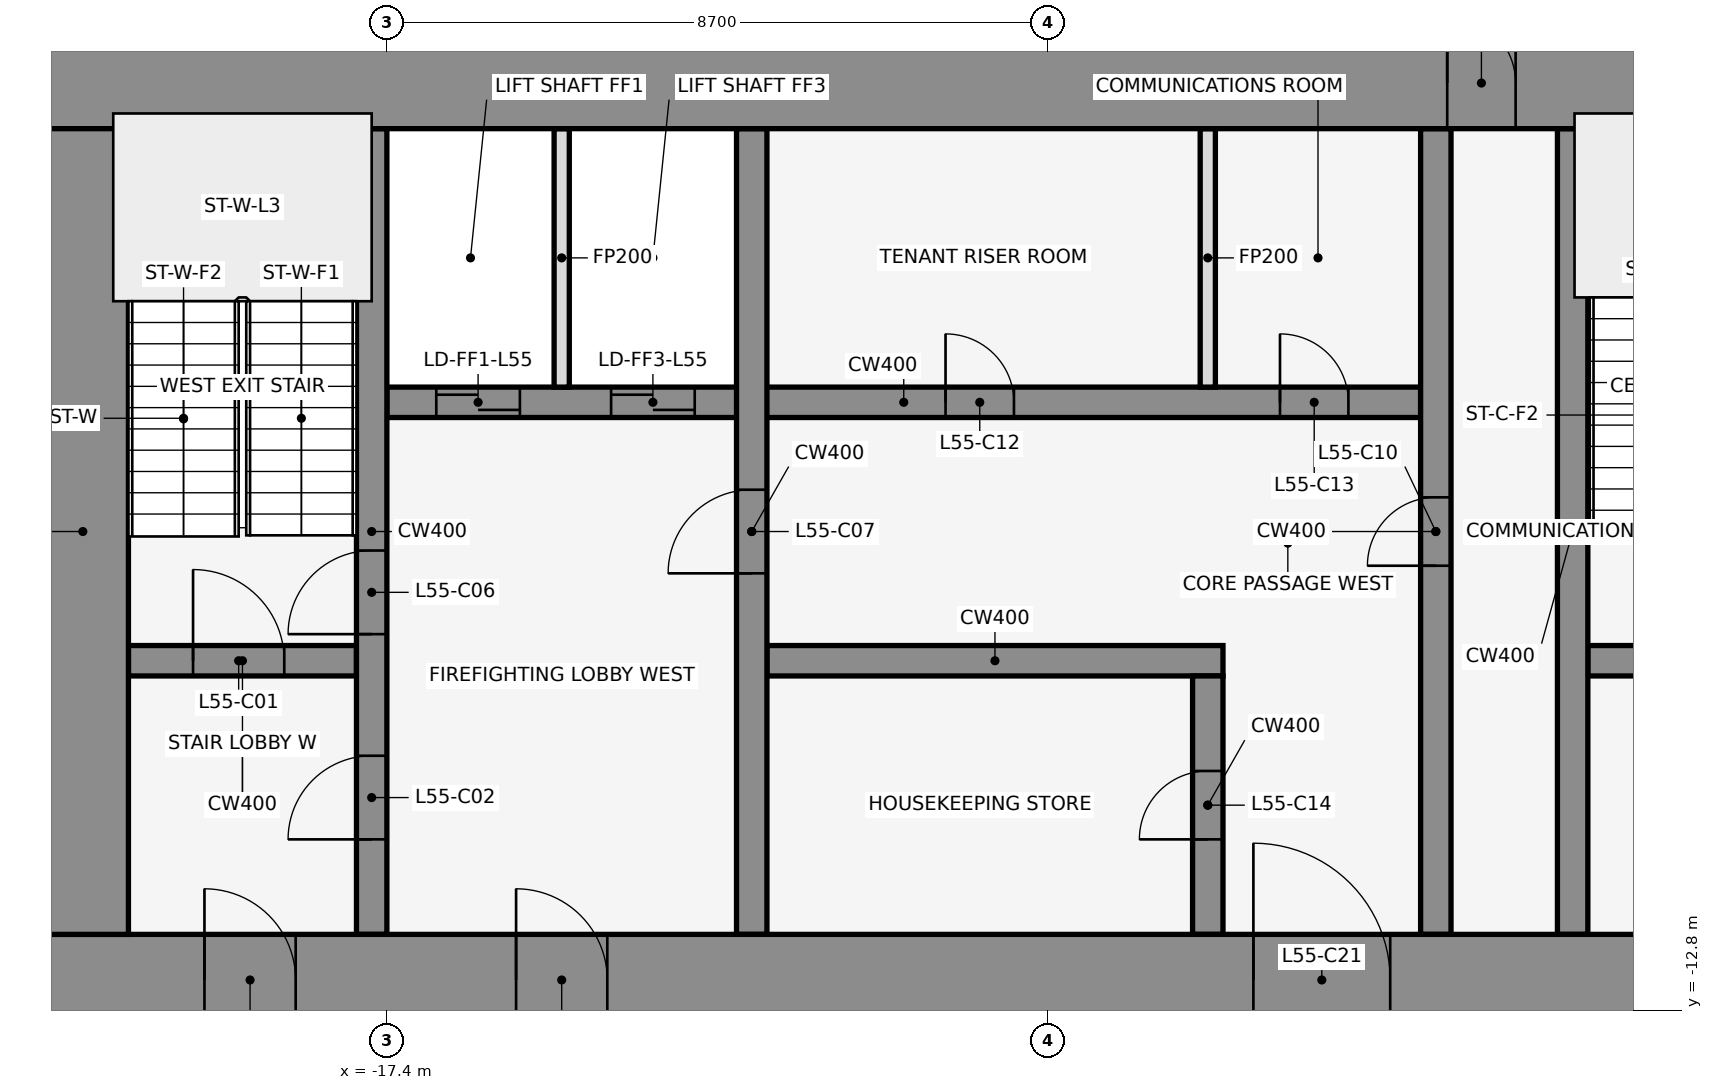
"""IFC4 building model, lengths in metres.
Left out: names, types, materials, properties, quantities, classifications, styles, units other than length and angle.
Written with IfcOpenShell. Run it as: python <this file> out.ifc"""

import sys

from ifc_helpers import new_model, si_unit, direction, frame, frame_2d, origin, place, context, subcontext, project, spatial, rectangle, extrude, element, fill, save


model = new_model("IFC4")
c1 = context("Model", 3, precision=1e-05, world=origin(), true_north=direction((0.0, 1.0)))
c2 = subcontext(c1, "Body", "Model", "MODEL_VIEW")
j1 = project(units=[si_unit("LENGTHUNIT", "METRE"), si_unit("PLANEANGLEUNIT", "RADIAN")], contexts=[c1])
p1 = place(None, origin())
s1 = spatial("IfcSite", under=j1, at=p1, CompositionType="ELEMENT")
p2 = place(p1, origin())
s2 = spatial("IfcBuilding", under=s1, at=p2, CompositionType="ELEMENT")
p3 = place(p2, frame((0.0, 0.0, 245.6)))
s3 = spatial("IfcBuildingStorey", under=s2, at=p3, CompositionType="ELEMENT", Elevation=245.6)
for number, where, z_axis, x_axis in (
    (1, (-0.068, -0.105, 0.0), (0.0, 0.0, 1.0), (-0.84, 0.543, 0.0)),
    (2, (-14.599, 1.08, 0.0), (0.0, 0.0, 1.0), (-0.84, -0.543, 0.0)),
):
    element("IfcWall", number, at=place(p3, frame(where, z_axis=z_axis, x_axis=x_axis)), inside=s3, PredefinedType="STANDARD", context=c2, shape_type="SweptSolid", body=[
        extrude(rectangle(XDim=2.183, YDim=0.25, at=frame_2d((1.091, 0.0))), origin(), (0.0, 0.0, 1.0), 4.05),
    ])
p4 = place(p3, frame((-20.8, -8.2, 0.0), z_axis=(0.0, 0.0, 1.0), x_axis=(1.0, 0.0, 0.0)))
e3 = element("IfcWall", 3, at=p4, inside=s3, PredefinedType="SHEAR", context=c2, shape_type="SweptSolid", body=[
    extrude(rectangle(XDim=3.0, YDim=0.4, at=frame_2d((1.5, 0.0))), origin(), (0.0, 0.0, 1.0), 4.2),
])
p5 = place(p4, frame((0.85, 0.0, 0.0)))
e4 = element("IfcOpeningElement", 4, at=p5, cuts=e3, PredefinedType="OPENING", context=c2, shape_type="SweptSolid", body=[
    extrude(rectangle(XDim=1.2, YDim=2.1, at=frame_2d((0.6, 1.05))), frame((0.0, 0.212, 0.0), z_axis=(0.0, -1.0, 0.0), x_axis=(1.0, 0.0, 0.0)), (0.0, 0.0, 1.0), 0.424),
])
p6 = place(p3, frame((-12.4, -8.2, 0.0), z_axis=(0.0, 0.0, 1.0), x_axis=(1.0, 0.0, 0.0)))
e5 = element("IfcWall", 5, at=p6, inside=s3, PredefinedType="SHEAR", context=c2, shape_type="SweptSolid", body=[
    extrude(rectangle(XDim=6.0, YDim=0.4, at=frame_2d((3.0, 0.0))), origin(), (0.0, 0.0, 1.0), 4.2),
])
p7 = place(p3, frame((-1.6, -8.2, 0.0), z_axis=(0.0, 0.0, 1.0), x_axis=(1.0, 0.0, 0.0)))
e6 = element("IfcWall", 6, at=p7, inside=s3, PredefinedType="SHEAR", context=c2, shape_type="SweptSolid", body=[
    extrude(rectangle(XDim=3.2, YDim=0.4, at=frame_2d((1.6, 0.0))), origin(), (0.0, 0.0, 1.0), 4.2),
])
p8 = place(p7, frame((1.05, 0.0, 0.0)))
e7 = element("IfcOpeningElement", 7, at=p8, cuts=e6, PredefinedType="OPENING", context=c2, shape_type="SweptSolid", body=[
    extrude(rectangle(XDim=1.2, YDim=2.1, at=frame_2d((0.6, 1.05))), frame((0.0, 0.212, 0.0), z_axis=(0.0, -1.0, 0.0), x_axis=(1.0, 0.0, 0.0)), (0.0, 0.0, 1.0), 0.424),
])
p9 = place(p3, frame((-17.4, -4.8, 0.0), z_axis=(0.0, 0.0, 1.0), x_axis=(1.0, 0.0, 0.0)))
e8 = element("IfcWall", 8, at=p9, inside=s3, PredefinedType="SHEAR", context=c2, shape_type="SweptSolid", body=[
    extrude(rectangle(XDim=13.6, YDim=0.4, at=frame_2d((6.8, 0.0))), origin(), (0.0, 0.0, 1.0), 4.2),
])
p10 = place(p9, frame((0.65, 0.0, 0.0)))
e9 = element("IfcOpeningElement", 9, at=p10, cuts=e8, PredefinedType="OPENING", context=c2, shape_type="SweptSolid", body=[
    extrude(rectangle(XDim=1.1, YDim=2.1, at=frame_2d((0.55, 1.05))), frame((0.0, 0.212, 0.0), z_axis=(0.0, -1.0, 0.0), x_axis=(1.0, 0.0, 0.0)), (0.0, 0.0, 1.0), 0.424),
])
p11 = place(p9, frame((2.95, 0.0, 0.0)))
e10 = element("IfcOpeningElement", 10, at=p11, cuts=e8, PredefinedType="OPENING", context=c2, shape_type="SweptSolid", body=[
    extrude(rectangle(XDim=1.1, YDim=2.1, at=frame_2d((0.55, 1.05))), frame((0.0, 0.212, 0.0), z_axis=(0.0, -1.0, 0.0), x_axis=(1.0, 0.0, 0.0)), (0.0, 0.0, 1.0), 0.424),
])
p12 = place(p9, frame((7.35, 0.0, 0.0)))
e11 = element("IfcOpeningElement", 11, at=p12, cuts=e8, PredefinedType="OPENING", context=c2, shape_type="SweptSolid", body=[
    extrude(rectangle(XDim=0.9, YDim=2.1, at=frame_2d((0.45, 1.05))), frame((0.0, 0.212, 0.0), z_axis=(0.0, -1.0, 0.0), x_axis=(1.0, 0.0, 0.0)), (0.0, 0.0, 1.0), 0.424),
])
p13 = place(p9, frame((11.75, 0.0, 0.0)))
e12 = element("IfcOpeningElement", 12, at=p13, cuts=e8, PredefinedType="OPENING", context=c2, shape_type="SweptSolid", body=[
    extrude(rectangle(XDim=0.9, YDim=2.1, at=frame_2d((0.45, 1.05))), frame((0.0, 0.212, 0.0), z_axis=(0.0, -1.0, 0.0), x_axis=(1.0, 0.0, 0.0)), (0.0, 0.0, 1.0), 0.424),
])
p14 = place(p3, frame((-17.6, -11.8, 0.0), z_axis=(0.0, 0.0, 1.0), x_axis=(0.0, 1.0, 0.0)))
e13 = element("IfcWall", 13, at=p14, inside=s3, PredefinedType="SHEAR", context=c2, shape_type="SweptSolid", body=[
    extrude(rectangle(XDim=10.6, YDim=0.4, at=frame_2d((5.3, 0.0))), origin(), (0.0, 0.0, 1.0), 4.2),
])
p15 = place(p14, frame((1.25, 0.0, 0.0)))
e14 = element("IfcOpeningElement", 14, at=p15, cuts=e13, PredefinedType="OPENING", context=c2, shape_type="SweptSolid", body=[
    extrude(rectangle(XDim=1.1, YDim=2.1, at=frame_2d((0.55, 1.05))), frame((0.0, 0.212, 0.0), z_axis=(0.0, -1.0, 0.0), x_axis=(1.0, 0.0, 0.0)), (0.0, 0.0, 1.0), 0.424),
])
p16 = place(p14, frame((3.95, 0.0, 0.0)))
e15 = element("IfcOpeningElement", 15, at=p16, cuts=e13, PredefinedType="OPENING", context=c2, shape_type="SweptSolid", body=[
    extrude(rectangle(XDim=1.1, YDim=2.1, at=frame_2d((0.55, 1.05))), frame((0.0, 0.212, 0.0), z_axis=(0.0, -1.0, 0.0), x_axis=(1.0, 0.0, 0.0)), (0.0, 0.0, 1.0), 0.424),
])
p17 = place(p3, frame((-15.1, -4.6, 0.0), z_axis=(0.0, 0.0, 1.0), x_axis=(0.0, 1.0, 0.0)))
e16 = element("IfcWall", 16, at=p17, inside=s3, PredefinedType="PARTITIONING", context=c2, shape_type="SweptSolid", body=[
    extrude(rectangle(XDim=3.4, YDim=0.2, at=frame_2d((1.7, 0.0))), origin(), (0.0, 0.0, 1.0), 3.039),
])
p18 = place(p3, frame((-12.6, -11.8, 0.0), z_axis=(0.0, 0.0, 1.0), x_axis=(0.0, 1.0, 0.0)))
e17 = element("IfcWall", 17, at=p18, inside=s3, PredefinedType="SHEAR", context=c2, shape_type="SweptSolid", body=[
    extrude(rectangle(XDim=10.6, YDim=0.4, at=frame_2d((5.3, 0.0))), origin(), (0.0, 0.0, 1.0), 4.2),
])
p19 = place(p18, frame((4.75, 0.0, 0.0)))
e18 = element("IfcOpeningElement", 18, at=p19, cuts=e17, PredefinedType="OPENING", context=c2, shape_type="SweptSolid", body=[
    extrude(rectangle(XDim=1.1, YDim=2.1, at=frame_2d((0.55, 1.05))), frame((0.0, 0.212, 0.0), z_axis=(0.0, -1.0, 0.0), x_axis=(1.0, 0.0, 0.0)), (0.0, 0.0, 1.0), 0.424),
])
p20 = place(p3, frame((-6.6, -11.8, 0.0), z_axis=(0.0, 0.0, 1.0), x_axis=(0.0, 1.0, 0.0)))
e19 = element("IfcWall", 19, at=p20, inside=s3, PredefinedType="SHEAR", context=c2, shape_type="SweptSolid", body=[
    extrude(rectangle(XDim=3.4, YDim=0.4, at=frame_2d((1.7, 0.0))), origin(), (0.0, 0.0, 1.0), 4.2),
])
p21 = place(p20, frame((1.25, 0.0, 0.0)))
e20 = element("IfcOpeningElement", 20, at=p21, cuts=e19, PredefinedType="OPENING", context=c2, shape_type="SweptSolid", body=[
    extrude(rectangle(XDim=0.9, YDim=2.1, at=frame_2d((0.45, 1.05))), frame((0.0, 0.212, 0.0), z_axis=(0.0, -1.0, 0.0), x_axis=(1.0, 0.0, 0.0)), (0.0, 0.0, 1.0), 0.424),
])
p22 = place(p3, frame((-6.6, -4.6, 0.0), z_axis=(0.0, 0.0, 1.0), x_axis=(0.0, 1.0, 0.0)))
e21 = element("IfcWall", 21, at=p22, inside=s3, PredefinedType="PARTITIONING", context=c2, shape_type="SweptSolid", body=[
    extrude(rectangle(XDim=3.4, YDim=0.2, at=frame_2d((1.7, 0.0))), origin(), (0.0, 0.0, 1.0), 3.039),
])
p23 = place(p3, frame((-3.6, -11.8, 0.0), z_axis=(0.0, 0.0, 1.0), x_axis=(0.0, 1.0, 0.0)))
e22 = element("IfcWall", 22, at=p23, inside=s3, PredefinedType="SHEAR", context=c2, shape_type="SweptSolid", body=[
    extrude(rectangle(XDim=10.6, YDim=0.4, at=frame_2d((5.3, 0.0))), origin(), (0.0, 0.0, 1.0), 4.2),
])
p24 = place(p23, frame((4.85, 0.0, 0.0)))
e23 = element("IfcOpeningElement", 23, at=p24, cuts=e22, PredefinedType="OPENING", context=c2, shape_type="SweptSolid", body=[
    extrude(rectangle(XDim=0.9, YDim=2.1, at=frame_2d((0.45, 1.05))), frame((0.0, 0.212, 0.0), z_axis=(0.0, -1.0, 0.0), x_axis=(1.0, 0.0, 0.0)), (0.0, 0.0, 1.0), 0.424),
])
p25 = place(p3, frame((-1.8, -11.8, 0.0), z_axis=(0.0, 0.0, 1.0), x_axis=(0.0, 1.0, 0.0)))
e24 = element("IfcWall", 24, at=p25, inside=s3, PredefinedType="SHEAR", context=c2, shape_type="SweptSolid", body=[
    extrude(rectangle(XDim=10.6, YDim=0.4, at=frame_2d((5.3, 0.0))), origin(), (0.0, 0.0, 1.0), 4.2),
])
p26 = place(p3, frame((-22.0, -0.6, 0.0), z_axis=(0.0, 0.0, 1.0), x_axis=(1.0, 0.0, 0.0)))
e25 = element("IfcWall", 25, at=p26, inside=s3, PredefinedType="SHEAR", context=c2, shape_type="SweptSolid", body=[
    extrude(rectangle(XDim=44.0, YDim=1.2, at=frame_2d((22.0, 0.0))), origin(), (0.0, 0.0, 1.0), 4.2),
])
p27 = place(p26, frame((18.55, 0.0, 0.0)))
e26 = element("IfcOpeningElement", 26, at=p27, cuts=e25, PredefinedType="OPENING", context=c2, shape_type="SweptSolid", body=[
    extrude(rectangle(XDim=0.9, YDim=2.1, at=frame_2d((0.45, 1.05))), frame((0.0, 0.612, 0.0), z_axis=(0.0, -1.0, 0.0), x_axis=(1.0, 0.0, 0.0)), (0.0, 0.0, 1.0), 1.224),
])
p28 = place(p26, frame((24.55, 0.0, 0.0)))
e27 = element("IfcOpeningElement", 27, at=p28, cuts=e25, PredefinedType="OPENING", context=c2, shape_type="SweptSolid", body=[
    extrude(rectangle(XDim=0.9, YDim=2.1, at=frame_2d((0.45, 1.05))), frame((0.0, 0.612, 0.0), z_axis=(0.0, -1.0, 0.0), x_axis=(1.0, 0.0, 0.0)), (0.0, 0.0, 1.0), 1.224),
])
p29 = place(p3, frame((-22.0, -12.4, 0.0), z_axis=(0.0, 0.0, 1.0), x_axis=(1.0, 0.0, 0.0)))
e28 = element("IfcWall", 28, at=p29, inside=s3, PredefinedType="SHEAR", context=c2, shape_type="SweptSolid", body=[
    extrude(rectangle(XDim=44.0, YDim=1.2, at=frame_2d((22.0, 0.0))), origin(), (0.0, 0.0, 1.0), 4.2),
])
p30 = place(p29, frame((2.2, 0.0, 0.0)))
e29 = element("IfcOpeningElement", 29, at=p30, cuts=e28, PredefinedType="OPENING", context=c2, shape_type="SweptSolid", body=[
    extrude(rectangle(XDim=1.2, YDim=2.1, at=frame_2d((0.6, 1.05))), frame((0.0, 0.612, 0.0), z_axis=(0.0, -1.0, 0.0), x_axis=(1.0, 0.0, 0.0)), (0.0, 0.0, 1.0), 1.224),
])
p31 = place(p29, frame((21.4, 0.0, 0.0)))
e30 = element("IfcOpeningElement", 30, at=p31, cuts=e28, PredefinedType="OPENING", context=c2, shape_type="SweptSolid", body=[
    extrude(rectangle(XDim=1.2, YDim=2.1, at=frame_2d((0.6, 1.05))), frame((0.0, 0.612, 0.0), z_axis=(0.0, -1.0, 0.0), x_axis=(1.0, 0.0, 0.0)), (0.0, 0.0, 1.0), 1.224),
])
p32 = place(p29, frame((40.6, 0.0, 0.0)))
e31 = element("IfcOpeningElement", 31, at=p32, cuts=e28, PredefinedType="OPENING", context=c2, shape_type="SweptSolid", body=[
    extrude(rectangle(XDim=1.2, YDim=2.1, at=frame_2d((0.6, 1.05))), frame((0.0, 0.612, 0.0), z_axis=(0.0, -1.0, 0.0), x_axis=(1.0, 0.0, 0.0)), (0.0, 0.0, 1.0), 1.224),
])
p33 = place(p29, frame((16.0, 0.0, 0.0)))
e32 = element("IfcOpeningElement", 32, at=p33, cuts=e28, PredefinedType="OPENING", context=c2, shape_type="SweptSolid", body=[
    extrude(rectangle(XDim=1.8, YDim=2.1, at=frame_2d((0.9, 1.05))), frame((0.0, 0.612, 0.0), z_axis=(0.0, -1.0, 0.0), x_axis=(1.0, 0.0, 0.0)), (0.0, 0.0, 1.0), 1.224),
])
p34 = place(p29, frame((6.3, 0.0, 0.0)))
e33 = element("IfcOpeningElement", 33, at=p34, cuts=e28, PredefinedType="OPENING", context=c2, shape_type="SweptSolid", body=[
    extrude(rectangle(XDim=1.2, YDim=2.1, at=frame_2d((0.6, 1.05))), frame((0.0, 0.612, 0.0), z_axis=(0.0, -1.0, 0.0), x_axis=(1.0, 0.0, 0.0)), (0.0, 0.0, 1.0), 1.224),
])
p35 = place(p29, frame((26.2, 0.0, 0.0)))
e34 = element("IfcOpeningElement", 34, at=p35, cuts=e28, PredefinedType="OPENING", context=c2, shape_type="SweptSolid", body=[
    extrude(rectangle(XDim=1.8, YDim=2.1, at=frame_2d((0.9, 1.05))), frame((0.0, 0.612, 0.0), z_axis=(0.0, -1.0, 0.0), x_axis=(1.0, 0.0, 0.0)), (0.0, 0.0, 1.0), 1.224),
])
p36 = place(p29, frame((36.5, 0.0, 0.0)))
e35 = element("IfcOpeningElement", 35, at=p36, cuts=e28, PredefinedType="OPENING", context=c2, shape_type="SweptSolid", body=[
    extrude(rectangle(XDim=1.2, YDim=2.1, at=frame_2d((0.6, 1.05))), frame((0.0, 0.612, 0.0), z_axis=(0.0, -1.0, 0.0), x_axis=(1.0, 0.0, 0.0)), (0.0, 0.0, 1.0), 1.224),
])
p37 = place(p3, frame((-21.4, -11.8, 0.0), z_axis=(0.0, 0.0, 1.0), x_axis=(0.0, 1.0, 0.0)))
e36 = element("IfcWall", 36, at=p37, inside=s3, PredefinedType="SHEAR", context=c2, shape_type="SweptSolid", body=[
    extrude(rectangle(XDim=10.6, YDim=1.2, at=frame_2d((5.3, 0.0))), origin(), (0.0, 0.0, 1.0), 4.2),
])
p38 = place(p5, origin())
e37 = element("IfcDoor", 37, at=p38, inside=s3, OperationType="SINGLE_SWING_LEFT", PredefinedType="DOOR", context=c2, shape_type="SweptSolid", body=[
    extrude(rectangle(XDim=1.2, YDim=2.1, at=frame_2d((0.6, 1.05))), frame((0.0, 0.025, 0.0), z_axis=(0.0, -1.0, 0.0), x_axis=(1.0, 0.0, 0.0)), (0.0, 0.0, 1.0), 0.05),
])
fill(e4, e37)
p39 = place(p15, frame((1.1, 0.0, 0.0), z_axis=(0.0, 0.0, 1.0), x_axis=(-1.0, 0.0, 0.0)))
e38 = element("IfcDoor", 38, at=p39, inside=s3, OperationType="SINGLE_SWING_LEFT", PredefinedType="DOOR", context=c2, shape_type="SweptSolid", body=[
    extrude(rectangle(XDim=1.1, YDim=2.1, at=frame_2d((0.55, 1.05))), frame((0.0, 0.025, 0.0), z_axis=(0.0, -1.0, 0.0), x_axis=(1.0, 0.0, 0.0)), (0.0, 0.0, 1.0), 0.05),
])
fill(e14, e38)
p40 = place(p10, origin())
e39 = element("IfcDoor", 39, at=p40, inside=s3, OperationType="DOUBLE_DOOR_SLIDING", PredefinedType="DOOR", context=c2, shape_type="SweptSolid", body=[
    extrude(rectangle(XDim=1.1, YDim=2.1, at=frame_2d((0.55, 1.05))), frame((0.0, 0.025, 0.0), z_axis=(0.0, -1.0, 0.0), x_axis=(1.0, 0.0, 0.0)), (0.0, 0.0, 1.0), 0.05),
])
fill(e9, e39)
p41 = place(p11, origin())
e40 = element("IfcDoor", 40, at=p41, inside=s3, OperationType="DOUBLE_DOOR_SLIDING", PredefinedType="DOOR", context=c2, shape_type="SweptSolid", body=[
    extrude(rectangle(XDim=1.1, YDim=2.1, at=frame_2d((0.55, 1.05))), frame((0.0, 0.025, 0.0), z_axis=(0.0, -1.0, 0.0), x_axis=(1.0, 0.0, 0.0)), (0.0, 0.0, 1.0), 0.05),
])
fill(e10, e40)
p42 = place(p16, frame((1.1, 0.0, 0.0), z_axis=(0.0, 0.0, 1.0), x_axis=(-1.0, 0.0, 0.0)))
e41 = element("IfcDoor", 41, at=p42, inside=s3, OperationType="SINGLE_SWING_LEFT", PredefinedType="DOOR", context=c2, shape_type="SweptSolid", body=[
    extrude(rectangle(XDim=1.1, YDim=2.1, at=frame_2d((0.55, 1.05))), frame((0.0, 0.025, 0.0), z_axis=(0.0, -1.0, 0.0), x_axis=(1.0, 0.0, 0.0)), (0.0, 0.0, 1.0), 0.05),
])
fill(e15, e41)
p43 = place(p19, origin())
e42 = element("IfcDoor", 42, at=p43, inside=s3, OperationType="SINGLE_SWING_LEFT", PredefinedType="DOOR", context=c2, shape_type="SweptSolid", body=[
    extrude(rectangle(XDim=1.1, YDim=2.1, at=frame_2d((0.55, 1.05))), frame((0.0, 0.025, 0.0), z_axis=(0.0, -1.0, 0.0), x_axis=(1.0, 0.0, 0.0)), (0.0, 0.0, 1.0), 0.05),
])
fill(e18, e42)
p44 = place(p24, frame((0.9, 0.0, 0.0), z_axis=(0.0, 0.0, 1.0), x_axis=(-1.0, 0.0, 0.0)))
e43 = element("IfcDoor", 43, at=p44, inside=s3, OperationType="SINGLE_SWING_LEFT", PredefinedType="DOOR", context=c2, shape_type="SweptSolid", body=[
    extrude(rectangle(XDim=0.9, YDim=2.1, at=frame_2d((0.45, 1.05))), frame((0.0, 0.025, 0.0), z_axis=(0.0, -1.0, 0.0), x_axis=(1.0, 0.0, 0.0)), (0.0, 0.0, 1.0), 0.05),
])
fill(e23, e43)
p45 = place(p12, origin())
e44 = element("IfcDoor", 44, at=p45, inside=s3, OperationType="SINGLE_SWING_RIGHT", PredefinedType="DOOR", context=c2, shape_type="SweptSolid", body=[
    extrude(rectangle(XDim=0.9, YDim=2.1, at=frame_2d((0.45, 1.05))), frame((0.0, 0.025, 0.0), z_axis=(0.0, -1.0, 0.0), x_axis=(1.0, 0.0, 0.0)), (0.0, 0.0, 1.0), 0.05),
])
fill(e11, e44)
p46 = place(p13, origin())
e45 = element("IfcDoor", 45, at=p46, inside=s3, OperationType="SINGLE_SWING_LEFT", PredefinedType="DOOR", context=c2, shape_type="SweptSolid", body=[
    extrude(rectangle(XDim=0.9, YDim=2.1, at=frame_2d((0.45, 1.05))), frame((0.0, 0.025, 0.0), z_axis=(0.0, -1.0, 0.0), x_axis=(1.0, 0.0, 0.0)), (0.0, 0.0, 1.0), 0.05),
])
fill(e12, e45)
p47 = place(p21, origin())
e46 = element("IfcDoor", 46, at=p47, inside=s3, OperationType="SINGLE_SWING_RIGHT", PredefinedType="DOOR", context=c2, shape_type="SweptSolid", body=[
    extrude(rectangle(XDim=0.9, YDim=2.1, at=frame_2d((0.45, 1.05))), frame((0.0, 0.025, 0.0), z_axis=(0.0, -1.0, 0.0), x_axis=(1.0, 0.0, 0.0)), (0.0, 0.0, 1.0), 0.05),
])
fill(e20, e46)
p48 = place(p27, origin())
e47 = element("IfcDoor", 47, at=p48, inside=s3, OperationType="SINGLE_SWING_LEFT", PredefinedType="DOOR", context=c2, shape_type="SweptSolid", body=[
    extrude(rectangle(XDim=0.9, YDim=2.1, at=frame_2d((0.45, 1.05))), frame((0.0, 0.025, 0.0), z_axis=(0.0, -1.0, 0.0), x_axis=(1.0, 0.0, 0.0)), (0.0, 0.0, 1.0), 0.05),
])
fill(e26, e47)
p49 = place(p30, frame((1.2, 0.0, 0.0), z_axis=(0.0, 0.0, 1.0), x_axis=(-1.0, 0.0, 0.0)))
e48 = element("IfcDoor", 48, at=p49, inside=s3, OperationType="SINGLE_SWING_RIGHT", PredefinedType="DOOR", context=c2, shape_type="SweptSolid", body=[
    extrude(rectangle(XDim=1.2, YDim=2.1, at=frame_2d((0.6, 1.05))), frame((0.0, 0.025, 0.0), z_axis=(0.0, -1.0, 0.0), x_axis=(1.0, 0.0, 0.0)), (0.0, 0.0, 1.0), 0.05),
])
fill(e29, e48)
p50 = place(p33, origin())
e49 = element("IfcDoor", 49, at=p50, inside=s3, OperationType="SINGLE_SWING_LEFT", PredefinedType="DOOR", context=c2, shape_type="SweptSolid", body=[
    extrude(rectangle(XDim=1.8, YDim=2.1, at=frame_2d((0.9, 1.05))), frame((0.0, 0.025, 0.0), z_axis=(0.0, -1.0, 0.0), x_axis=(1.0, 0.0, 0.0)), (0.0, 0.0, 1.0), 0.05),
])
fill(e32, e49)
p51 = place(p34, frame((1.2, 0.0, 0.0), z_axis=(0.0, 0.0, 1.0), x_axis=(-1.0, 0.0, 0.0)))
e50 = element("IfcDoor", 50, at=p51, inside=s3, OperationType="SINGLE_SWING_RIGHT", PredefinedType="DOOR", context=c2, shape_type="SweptSolid", body=[
    extrude(rectangle(XDim=1.2, YDim=2.1, at=frame_2d((0.6, 1.05))), frame((0.0, 0.025, 0.0), z_axis=(0.0, -1.0, 0.0), x_axis=(1.0, 0.0, 0.0)), (0.0, 0.0, 1.0), 0.05),
])
fill(e33, e50)
save(model, sys.argv[1])
